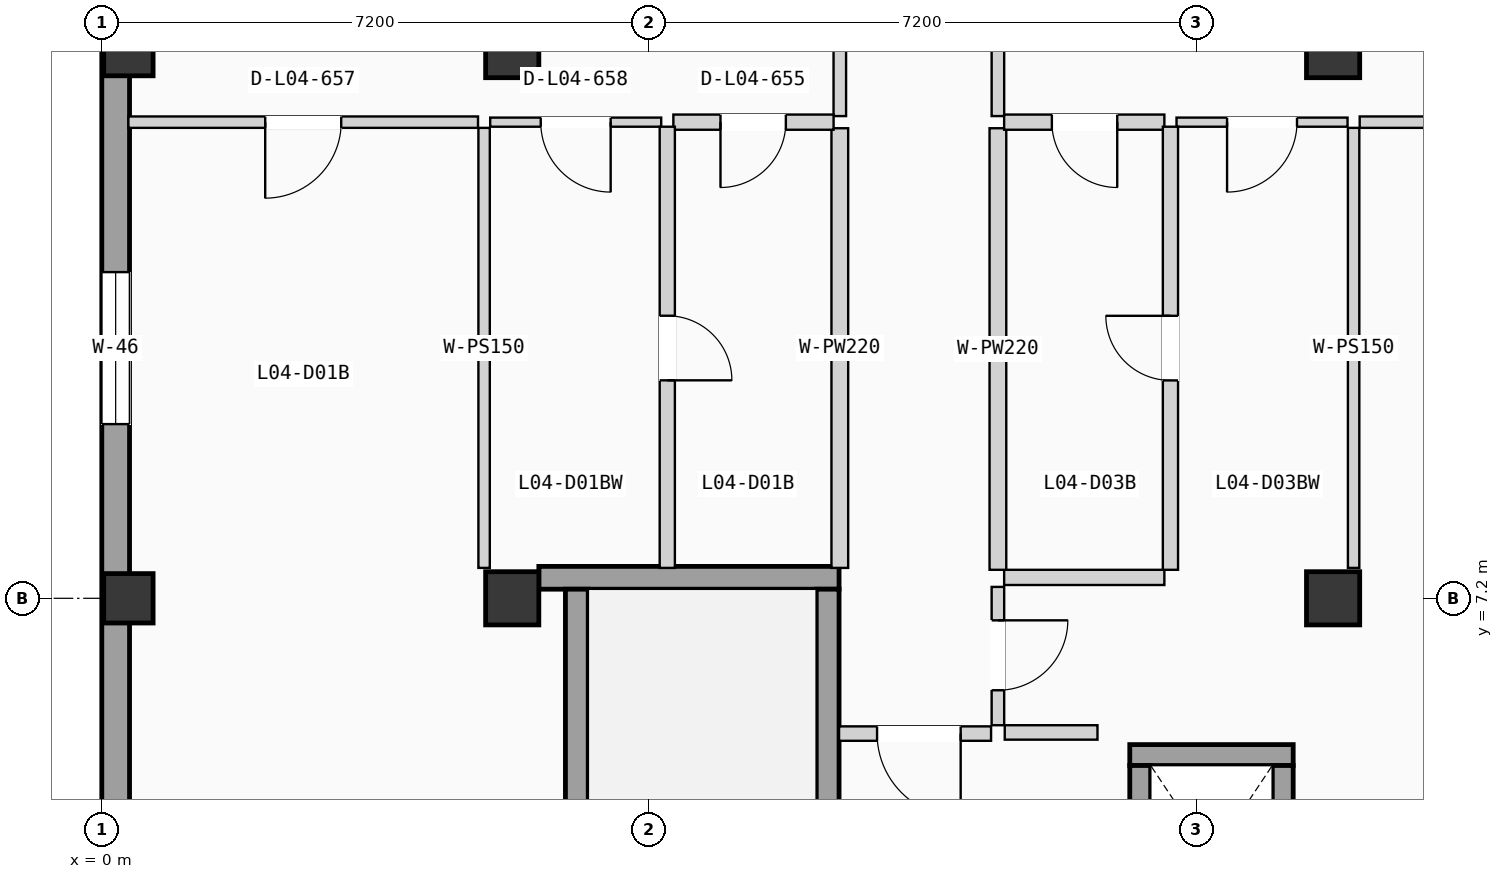
"""IFC4 building model, lengths in metres.
Left out: names, types, materials, properties, quantities, classifications, styles, units other than length and angle.
Written with IfcOpenShell. Run it as: python <this file> out.ifc"""

import sys

from ifc_helpers import new_model, si_unit, direction, frame, frame_2d, origin, origin_2d, place, context, subcontext, project, spatial, rectangle, extrude, element, fill, save


model = new_model("IFC4")
c1 = context("Model", 3, precision=1e-05, world=origin(), true_north=direction((0.0, 1.0)))
c2 = subcontext(c1, "Body", "Model", "MODEL_VIEW")
j1 = project(units=[si_unit("LENGTHUNIT", "METRE"), si_unit("PLANEANGLEUNIT", "RADIAN")], contexts=[c1])
p1 = place(None, origin())
s1 = spatial("IfcSite", under=j1, at=p1, CompositionType="ELEMENT")
p2 = place(p1, origin())
s2 = spatial("IfcBuilding", under=s1, at=p2, CompositionType="ELEMENT")
p3 = place(p2, frame((0.0, 0.0, 15.225)))
s3 = spatial("IfcBuildingStorey", under=s2, at=p3, CompositionType="ELEMENT", Elevation=15.225)
for number, where, z_axis, x_axis in (
    (1, (0.35, 7.2, 0.0), (0.0, 0.0, 1.0), (1.0, 0.0, 0.0)),
    (2, (0.35, 14.4, 0.0), (0.0, 0.0, 1.0), (1.0, 0.0, 0.0)),
):
    element("IfcColumn", number, at=place(p3, frame(where, z_axis=z_axis, x_axis=x_axis)), inside=s3, PredefinedType="COLUMN", context=c2, shape_type="SweptSolid", body=[
        extrude(rectangle(XDim=0.65, YDim=0.65, at=origin_2d()), origin(), (0.0, 0.0, 1.0), 3.15),
    ])
for number, where, z_axis, x_axis in (
    (3, (5.4, 7.2, 0.0), (0.0, 0.0, 1.0), (1.0, 0.0, 0.0)),
    (4, (5.4, 14.4, 0.0), (0.0, 0.0, 1.0), (1.0, 0.0, 0.0)),
    (5, (16.2, 7.2, 0.0), (0.0, 0.0, 1.0), (1.0, 0.0, 0.0)),
    (6, (16.2, 14.4, 0.0), (0.0, 0.0, 1.0), (1.0, 0.0, 0.0)),
):
    element("IfcColumn", number, at=place(p3, frame(where, z_axis=z_axis, x_axis=x_axis)), inside=s3, PredefinedType="COLUMN", context=c2, shape_type="SweptSolid", body=[
        extrude(rectangle(XDim=0.7, YDim=0.7, at=origin_2d()), origin(), (0.0, 0.0, 1.0), 3.15),
    ])
p4 = place(p3, frame((0.183, 0.365, 0.0), z_axis=(0.0, 0.0, 1.0), x_axis=(0.0, 1.0, 0.0)))
e7 = element("IfcWall", 7, at=p4, inside=s3, PredefinedType="SOLIDWALL", context=c2, shape_type="SweptSolid", body=[
    extrude(rectangle(XDim=49.67, YDim=0.365, at=frame_2d((24.835, 0.0))), origin(), (0.0, 0.0, 1.0), 2.89),
])
p5 = place(p4, frame((16.782, 0.0, 0.85)))
e8 = element("IfcOpeningElement", 8, at=p5, cuts=e7, PredefinedType="OPENING", context=c2, shape_type="SweptSolid", body=[
    extrude(rectangle(XDim=0.95, YDim=1.2, at=frame_2d((0.475, 0.6))), frame((0.0, 0.192, 0.0), z_axis=(0.0, -1.0, 0.0), x_axis=(1.0, 0.0, 0.0)), (0.0, 0.0, 1.0), 0.385),
])
p6 = place(p4, frame((9.127, 0.0, 0.9)))
e9 = element("IfcOpeningElement", 9, at=p6, cuts=e7, PredefinedType="OPENING", context=c2, shape_type="SweptSolid", body=[
    extrude(rectangle(XDim=2.0, YDim=1.2, at=frame_2d((1.0, 0.6))), frame((0.0, 0.192, 0.0), z_axis=(0.0, -1.0, 0.0), x_axis=(1.0, 0.0, 0.0)), (0.0, 0.0, 1.0), 0.385),
])
p7 = place(p4, frame((22.829, 0.0, 0.855)))
e10 = element("IfcOpeningElement", 10, at=p7, cuts=e7, PredefinedType="OPENING", context=c2, shape_type="SweptSolid", body=[
    extrude(rectangle(XDim=2.0, YDim=1.35, at=frame_2d((1.0, 0.675))), frame((0.0, 0.192, 0.0), z_axis=(0.0, -1.0, 0.0), x_axis=(1.0, 0.0, 0.0)), (0.0, 0.0, 1.0), 0.385),
])
p8 = place(p4, frame((32.385, 0.0, 0.705)))
e11 = element("IfcOpeningElement", 11, at=p8, cuts=e7, PredefinedType="OPENING", context=c2, shape_type="SweptSolid", body=[
    extrude(rectangle(XDim=2.0, YDim=1.5, at=frame_2d((1.0, 0.75))), frame((0.0, 0.192, 0.0), z_axis=(0.0, -1.0, 0.0), x_axis=(1.0, 0.0, 0.0)), (0.0, 0.0, 1.0), 0.385),
])
p9 = place(p4, frame((28.975, 0.0, 0.555)))
e12 = element("IfcOpeningElement", 12, at=p9, cuts=e7, PredefinedType="OPENING", context=c2, shape_type="SweptSolid", body=[
    extrude(rectangle(XDim=2.0, YDim=1.65, at=frame_2d((1.0, 0.825))), frame((0.0, 0.192, 0.0), z_axis=(0.0, -1.0, 0.0), x_axis=(1.0, 0.0, 0.0)), (0.0, 0.0, 1.0), 0.385),
])
p10 = place(p4, frame((39.504, 0.0, 0.85)))
e13 = element("IfcOpeningElement", 13, at=p10, cuts=e7, PredefinedType="OPENING", context=c2, shape_type="SweptSolid", body=[
    extrude(rectangle(XDim=0.95, YDim=1.2, at=frame_2d((0.475, 0.6))), frame((0.0, 0.192, 0.0), z_axis=(0.0, -1.0, 0.0), x_axis=(1.0, 0.0, 0.0)), (0.0, 0.0, 1.0), 0.385),
])
p11 = place(p3, frame((5.75, 7.47, 0.0), z_axis=(0.0, 0.0, 1.0), x_axis=(1.0, 0.0, 0.0)))
e14 = element("IfcWall", 14, at=p11, inside=s3, PredefinedType="SHEAR", context=c2, shape_type="SweptSolid", body=[
    extrude(rectangle(XDim=3.95, YDim=0.3, at=frame_2d((1.975, 0.0))), origin(), (0.0, 0.0, 1.0), 2.89),
])
p12 = place(p3, frame((6.25, 0.32, 0.0), z_axis=(0.0, 0.0, 1.0), x_axis=(0.0, 1.0, 0.0)))
e15 = element("IfcWall", 15, at=p12, inside=s3, PredefinedType="SHEAR", context=c2, shape_type="SweptSolid", body=[
    extrude(rectangle(XDim=7.0, YDim=0.3, at=frame_2d((3.5, 0.0))), origin(), (0.0, 0.0, 1.0), 2.89),
])
p13 = place(p3, frame((9.55, 0.32, 0.0), z_axis=(0.0, 0.0, 1.0), x_axis=(0.0, 1.0, 0.0)))
e16 = element("IfcWall", 16, at=p13, inside=s3, PredefinedType="SHEAR", context=c2, shape_type="SweptSolid", body=[
    extrude(rectangle(XDim=7.0, YDim=0.3, at=frame_2d((3.5, 0.0))), origin(), (0.0, 0.0, 1.0), 2.89),
])
p14 = place(p13, frame((0.225, 0.0, 0.0)))
e17 = element("IfcOpeningElement", 17, at=p14, cuts=e16, PredefinedType="OPENING", context=c2, shape_type="SweptSolid", body=[
    extrude(rectangle(XDim=1.15, YDim=2.12, at=frame_2d((0.575, 1.06))), frame((0.0, 0.16, 0.0), z_axis=(0.0, -1.0, 0.0), x_axis=(1.0, 0.0, 0.0)), (0.0, 0.0, 1.0), 0.32),
])
p15 = place(p3, frame((13.525, 5.137, 0.0), z_axis=(0.0, 0.0, 1.0), x_axis=(1.0, 0.0, 0.0)))
e18 = element("IfcWall", 18, at=p15, inside=s3, PredefinedType="SHEAR", context=c2, shape_type="SweptSolid", body=[
    extrude(rectangle(XDim=2.15, YDim=0.275, at=frame_2d((1.075, 0.0))), origin(), (0.0, 0.0, 1.0), 2.89),
])
p16 = place(p3, frame((13.663, 2.6, 0.0), z_axis=(0.0, 0.0, 1.0), x_axis=(0.0, 1.0, 0.0)))
e19 = element("IfcWall", 19, at=p16, inside=s3, PredefinedType="SHEAR", context=c2, shape_type="SweptSolid", body=[
    extrude(rectangle(XDim=2.4, YDim=0.275, at=frame_2d((1.2, 0.0))), origin(), (0.0, 0.0, 1.0), 2.89),
])
p17 = place(p16, frame((0.65, 0.0, 0.0)))
e20 = element("IfcOpeningElement", 20, at=p17, cuts=e19, PredefinedType="OPENING", context=c2, shape_type="SweptSolid", body=[
    extrude(rectangle(XDim=1.1, YDim=2.15, at=frame_2d((0.55, 1.075))), frame((0.0, 0.147, 0.0), z_axis=(0.0, -1.0, 0.0), x_axis=(1.0, 0.0, 0.0)), (0.0, 0.0, 1.0), 0.295),
])
p18 = place(p3, frame((15.538, 2.6, 0.0), z_axis=(0.0, 0.0, 1.0), x_axis=(0.0, 1.0, 0.0)))
e21 = element("IfcWall", 21, at=p18, inside=s3, PredefinedType="SHEAR", context=c2, shape_type="SweptSolid", body=[
    extrude(rectangle(XDim=2.4, YDim=0.275, at=frame_2d((1.2, 0.0))), origin(), (0.0, 0.0, 1.0), 2.89),
])
p19 = place(p3, frame((11.88, 5.435, 0.0), z_axis=(0.0, 0.0, 1.0), x_axis=(1.0, 0.0, 0.0)))
e22 = element("IfcWall", 22, at=p19, inside=s3, PredefinedType="PARTITIONING", context=c2, shape_type="SweptSolid", body=[
    extrude(rectangle(XDim=1.22, YDim=0.19, at=frame_2d((0.61, 0.0))), origin(), (0.0, 0.0, 1.0), 2.87),
])
p20 = place(p3, frame((9.7, 5.42, 0.0), z_axis=(0.0, 0.0, 1.0), x_axis=(1.0, 0.0, 0.0)))
e23 = element("IfcWall", 23, at=p20, inside=s3, PredefinedType="PARTITIONING", context=c2, shape_type="SweptSolid", body=[
    extrude(rectangle(XDim=2.0, YDim=0.19, at=frame_2d((1.0, 0.0))), origin(), (0.0, 0.0, 1.0), 2.87),
])
p21 = place(p20, frame((0.5, 0.0, 0.0)))
e24 = element("IfcOpeningElement", 24, at=p21, cuts=e23, PredefinedType="OPENING", context=c2, shape_type="SweptSolid", body=[
    extrude(rectangle(XDim=1.1, YDim=2.12, at=frame_2d((0.55, 1.06))), frame((0.0, 0.105, 0.0), z_axis=(0.0, -1.0, 0.0), x_axis=(1.0, 0.0, 0.0)), (0.0, 0.0, 1.0), 0.21),
])
p22 = place(p3, frame((11.79, 5.53, 0.0), z_axis=(0.0, 0.0, 1.0), x_axis=(0.0, 1.0, 0.0)))
e25 = element("IfcWall", 25, at=p22, inside=s3, PredefinedType="PARTITIONING", context=c2, shape_type="SweptSolid", body=[
    extrude(rectangle(XDim=1.82, YDim=0.165, at=frame_2d((0.91, 0.0))), origin(), (0.0, 0.0, 1.0), 2.87),
])
p23 = place(p22, frame((0.46, 0.0, 0.0)))
e26 = element("IfcOpeningElement", 26, at=p23, cuts=e25, PredefinedType="OPENING", context=c2, shape_type="SweptSolid", body=[
    extrude(rectangle(XDim=0.92, YDim=2.04, at=frame_2d((0.46, 1.02))), frame((0.0, 0.093, 0.0), z_axis=(0.0, -1.0, 0.0), x_axis=(1.0, 0.0, 0.0)), (0.0, 0.0, 1.0), 0.185),
])
p24 = place(p3, frame((11.872, 7.475, 0.0), z_axis=(0.0, 0.0, 1.0), x_axis=(1.0, 0.0, 0.0)))
e27 = element("IfcWall", 27, at=p24, inside=s3, PredefinedType="PLUMBINGWALL", context=c2, shape_type="SweptSolid", body=[
    extrude(rectangle(XDim=2.108, YDim=0.2, at=frame_2d((1.054, 0.0))), origin(), (0.0, 0.0, 1.0), 2.87),
])
p25 = place(p3, frame((9.71, 13.545, 0.0), z_axis=(0.0, 0.0, 1.0), x_axis=(0.0, 1.0, 0.0)))
e28 = element("IfcWall", 28, at=p25, inside=s3, PredefinedType="PARTITIONING", context=c2, shape_type="SweptSolid", body=[
    extrude(rectangle(XDim=7.028, YDim=0.165, at=frame_2d((3.514, 0.0))), origin(), (0.0, 0.0, 1.0), 2.87),
])
p26 = place(p25, frame((3.009, 0.0, 0.0)))
e29 = element("IfcOpeningElement", 29, at=p26, cuts=e28, PredefinedType="OPENING", context=c2, shape_type="SweptSolid", body=[
    extrude(rectangle(XDim=1.01, YDim=2.11, at=frame_2d((0.505, 1.055))), frame((0.0, 0.093, 0.0), z_axis=(0.0, -1.0, 0.0), x_axis=(1.0, 0.0, 0.0)), (0.0, 0.0, 1.0), 0.185),
])
p27 = place(p3, frame((9.71, 7.6, 0.0), z_axis=(0.0, 0.0, 1.0), x_axis=(0.0, 1.0, 0.0)))
e30 = element("IfcWall", 30, at=p27, inside=s3, PredefinedType="PLUMBINGWALL", context=c2, shape_type="SweptSolid", body=[
    extrude(rectangle(XDim=5.785, YDim=0.22, at=frame_2d((2.893, 0.0))), origin(), (0.0, 0.0, 1.0), 2.87),
])
p28 = place(p3, frame((11.79, 13.545, 0.0), z_axis=(0.0, 0.0, 1.0), x_axis=(0.0, 1.0, 0.0)))
e31 = element("IfcWall", 31, at=p28, inside=s3, PredefinedType="PARTITIONING", context=c2, shape_type="SweptSolid", body=[
    extrude(rectangle(XDim=7.028, YDim=0.165, at=frame_2d((3.514, 0.0))), origin(), (0.0, 0.0, 1.0), 2.87),
])
p29 = place(p28, frame((3.009, 0.0, 0.0)))
e32 = element("IfcOpeningElement", 32, at=p29, cuts=e31, PredefinedType="OPENING", context=c2, shape_type="SweptSolid", body=[
    extrude(rectangle(XDim=1.01, YDim=2.11, at=frame_2d((0.505, 1.055))), frame((0.0, 0.093, 0.0), z_axis=(0.0, -1.0, 0.0), x_axis=(1.0, 0.0, 0.0)), (0.0, 0.0, 1.0), 0.185),
])
p30 = place(p3, frame((11.79, 7.575, 0.0), z_axis=(0.0, 0.0, 1.0), x_axis=(0.0, 1.0, 0.0)))
e33 = element("IfcWall", 33, at=p30, inside=s3, PredefinedType="PLUMBINGWALL", context=c2, shape_type="SweptSolid", body=[
    extrude(rectangle(XDim=5.81, YDim=0.22, at=frame_2d((2.905, 0.0))), origin(), (0.0, 0.0, 1.0), 2.87),
])
p31 = place(p3, frame((7.52, 13.465, 0.0), z_axis=(0.0, 0.0, 1.0), x_axis=(1.0, 0.0, 0.0)))
e34 = element("IfcWall", 34, at=p31, inside=s3, PredefinedType="PLUMBINGWALL", context=c2, shape_type="SweptSolid", body=[
    extrude(rectangle(XDim=2.108, YDim=0.2, at=frame_2d((1.054, 0.0))), origin(), (0.0, 0.0, 1.0), 2.87),
])
p32 = place(p31, frame((0.62, 0.0, 0.0)))
e35 = element("IfcOpeningElement", 35, at=p32, cuts=e34, PredefinedType="OPENING", context=c2, shape_type="SweptSolid", body=[
    extrude(rectangle(XDim=0.86, YDim=2.0, at=frame_2d((0.43, 1.0))), frame((0.0, 0.11, 0.0), z_axis=(0.0, -1.0, 0.0), x_axis=(1.0, 0.0, 0.0)), (0.0, 0.0, 1.0), 0.22),
])
p33 = place(p3, frame((0.35, 13.465, 0.0), z_axis=(0.0, 0.0, 1.0), x_axis=(1.0, 0.0, 0.0)))
e36 = element("IfcWall", 36, at=p33, inside=s3, PredefinedType="PARTITIONING", context=c2, shape_type="SweptSolid", body=[
    extrude(rectangle(XDim=4.6, YDim=0.15, at=frame_2d((2.3, 0.0))), origin(), (0.0, 0.0, 1.0), 2.87),
])
p34 = place(p33, frame((1.8, 0.0, 0.0)))
e37 = element("IfcOpeningElement", 37, at=p34, cuts=e36, PredefinedType="OPENING", context=c2, shape_type="SweptSolid", body=[
    extrude(rectangle(XDim=1.0, YDim=2.06, at=frame_2d((0.5, 1.03))), frame((0.0, 0.085, 0.0), z_axis=(0.0, -1.0, 0.0), x_axis=(1.0, 0.0, 0.0)), (0.0, 0.0, 1.0), 0.17),
])
p35 = place(p3, frame((5.11, 13.465, 0.0), z_axis=(0.0, 0.0, 1.0), x_axis=(1.0, 0.0, 0.0)))
e38 = element("IfcWall", 38, at=p35, inside=s3, PredefinedType="PARTITIONING", context=c2, shape_type="SweptSolid", body=[
    extrude(rectangle(XDim=2.25, YDim=0.12, at=frame_2d((1.125, 0.0))), origin(), (0.0, 0.0, 1.0), 2.87),
])
p36 = place(p35, frame((0.665, 0.0, 0.0)))
e39 = element("IfcOpeningElement", 39, at=p36, cuts=e38, PredefinedType="OPENING", context=c2, shape_type="SweptSolid", body=[
    extrude(rectangle(XDim=0.92, YDim=2.02, at=frame_2d((0.46, 1.01))), frame((0.0, 0.07, 0.0), z_axis=(0.0, -1.0, 0.0), x_axis=(1.0, 0.0, 0.0)), (0.0, 0.0, 1.0), 0.14),
])
p37 = place(p3, frame((7.44, 7.6, 0.0), z_axis=(0.0, 0.0, 1.0), x_axis=(0.0, 1.0, 0.0)))
e40 = element("IfcWall", 40, at=p37, inside=s3, PredefinedType="PLUMBINGWALL", context=c2, shape_type="SweptSolid", body=[
    extrude(rectangle(XDim=5.805, YDim=0.2, at=frame_2d((2.902, 0.0))), origin(), (0.0, 0.0, 1.0), 2.87),
])
p38 = place(p37, frame((2.468, 0.0, 0.0)))
e41 = element("IfcOpeningElement", 41, at=p38, cuts=e40, PredefinedType="OPENING", context=c2, shape_type="SweptSolid", body=[
    extrude(rectangle(XDim=0.85, YDim=2.01, at=frame_2d((0.425, 1.005))), frame((0.0, 0.11, 0.0), z_axis=(0.0, -1.0, 0.0), x_axis=(1.0, 0.0, 0.0)), (0.0, 0.0, 1.0), 0.22),
])
p39 = place(p3, frame((5.03, 7.6, 0.0), z_axis=(0.0, 0.0, 1.0), x_axis=(0.0, 1.0, 0.0)))
e42 = element("IfcWall", 42, at=p39, inside=s3, PredefinedType="PARTITIONING", context=c2, shape_type="SweptSolid", body=[
    extrude(rectangle(XDim=5.79, YDim=0.15, at=frame_2d((2.895, 0.0))), origin(), (0.0, 0.0, 1.0), 2.87),
])
p40 = place(p3, frame((11.872, 13.465, 0.0), z_axis=(0.0, 0.0, 1.0), x_axis=(1.0, 0.0, 0.0)))
e43 = element("IfcWall", 43, at=p40, inside=s3, PredefinedType="PLUMBINGWALL", context=c2, shape_type="SweptSolid", body=[
    extrude(rectangle(XDim=2.108, YDim=0.2, at=frame_2d((1.054, 0.0))), origin(), (0.0, 0.0, 1.0), 2.87),
])
p41 = place(p40, frame((0.628, 0.0, 0.0)))
e44 = element("IfcOpeningElement", 44, at=p41, cuts=e43, PredefinedType="OPENING", context=c2, shape_type="SweptSolid", body=[
    extrude(rectangle(XDim=0.86, YDim=2.0, at=frame_2d((0.43, 1.0))), frame((0.0, 0.11, 0.0), z_axis=(0.0, -1.0, 0.0), x_axis=(1.0, 0.0, 0.0)), (0.0, 0.0, 1.0), 0.22),
])
p42 = place(p3, frame((16.55, 13.465, 0.0), z_axis=(0.0, 0.0, 1.0), x_axis=(1.0, 0.0, 0.0)))
e45 = element("IfcWall", 45, at=p42, inside=s3, PredefinedType="PARTITIONING", context=c2, shape_type="SweptSolid", body=[
    extrude(rectangle(XDim=4.7, YDim=0.15, at=frame_2d((2.35, 0.0))), origin(), (0.0, 0.0, 1.0), 2.87),
])
p43 = place(p42, frame((1.88, 0.0, 0.0)))
e46 = element("IfcOpeningElement", 46, at=p43, cuts=e45, PredefinedType="OPENING", context=c2, shape_type="SweptSolid", body=[
    extrude(rectangle(XDim=0.94, YDim=2.06, at=frame_2d((0.47, 1.03))), frame((0.0, 0.085, 0.0), z_axis=(0.0, -1.0, 0.0), x_axis=(1.0, 0.0, 0.0)), (0.0, 0.0, 1.0), 0.17),
])
p44 = place(p3, frame((14.14, 13.465, 0.0), z_axis=(0.0, 0.0, 1.0), x_axis=(1.0, 0.0, 0.0)))
e47 = element("IfcWall", 47, at=p44, inside=s3, PredefinedType="PARTITIONING", context=c2, shape_type="SweptSolid", body=[
    extrude(rectangle(XDim=2.25, YDim=0.12, at=frame_2d((1.125, 0.0))), origin(), (0.0, 0.0, 1.0), 2.87),
])
p45 = place(p44, frame((0.665, 0.0, 0.0)))
e48 = element("IfcOpeningElement", 48, at=p45, cuts=e47, PredefinedType="OPENING", context=c2, shape_type="SweptSolid", body=[
    extrude(rectangle(XDim=0.92, YDim=2.02, at=frame_2d((0.46, 1.01))), frame((0.0, 0.07, 0.0), z_axis=(0.0, -1.0, 0.0), x_axis=(1.0, 0.0, 0.0)), (0.0, 0.0, 1.0), 0.14),
])
p46 = place(p3, frame((14.06, 7.575, 0.0), z_axis=(0.0, 0.0, 1.0), x_axis=(0.0, 1.0, 0.0)))
e49 = element("IfcWall", 49, at=p46, inside=s3, PredefinedType="PLUMBINGWALL", context=c2, shape_type="SweptSolid", body=[
    extrude(rectangle(XDim=5.83, YDim=0.2, at=frame_2d((2.915, 0.0))), origin(), (0.0, 0.0, 1.0), 2.87),
])
p47 = place(p46, frame((2.492, 0.0, 0.0)))
e50 = element("IfcOpeningElement", 50, at=p47, cuts=e49, PredefinedType="OPENING", context=c2, shape_type="SweptSolid", body=[
    extrude(rectangle(XDim=0.85, YDim=2.01, at=frame_2d((0.425, 1.005))), frame((0.0, 0.11, 0.0), z_axis=(0.0, -1.0, 0.0), x_axis=(1.0, 0.0, 0.0)), (0.0, 0.0, 1.0), 0.22),
])
p48 = place(p3, frame((16.47, 7.6, 0.0), z_axis=(0.0, 0.0, 1.0), x_axis=(0.0, 1.0, 0.0)))
e51 = element("IfcWall", 51, at=p48, inside=s3, PredefinedType="PARTITIONING", context=c2, shape_type="SweptSolid", body=[
    extrude(rectangle(XDim=5.79, YDim=0.15, at=frame_2d((2.895, 0.0))), origin(), (0.0, 0.0, 1.0), 2.87),
])
p49 = place(p6, origin())
e52 = element("IfcWindow", 52, at=p49, inside=s3, PartitioningType="DOUBLE_PANEL_VERTICAL", PredefinedType="WINDOW", context=c2, shape_type="SweptSolid", body=[
    extrude(rectangle(XDim=2.0, YDim=1.2, at=frame_2d((1.0, 0.6))), frame((0.0, 0.03, 0.0), z_axis=(0.0, -1.0, 0.0), x_axis=(1.0, 0.0, 0.0)), (0.0, 0.0, 1.0), 0.06),
])
fill(e9, e52)
p50 = place(p21, frame((1.1, 0.0, 0.0), z_axis=(0.0, 0.0, 1.0), x_axis=(-1.0, 0.0, 0.0)))
e53 = element("IfcDoor", 53, at=p50, inside=s3, OperationType="SINGLE_SWING_RIGHT", PredefinedType="DOOR", context=c2, shape_type="SweptSolid", body=[
    extrude(rectangle(XDim=1.1, YDim=2.12, at=frame_2d((0.55, 1.06))), frame((0.0, 0.025, 0.0), z_axis=(0.0, -1.0, 0.0), x_axis=(1.0, 0.0, 0.0)), (0.0, 0.0, 1.0), 0.05),
])
fill(e24, e53)
p51 = place(p23, frame((0.92, 0.0, 0.0), z_axis=(0.0, 0.0, 1.0), x_axis=(-1.0, 0.0, 0.0)))
e54 = element("IfcDoor", 54, at=p51, inside=s3, OperationType="SINGLE_SWING_RIGHT", PredefinedType="DOOR", context=c2, shape_type="SweptSolid", body=[
    extrude(rectangle(XDim=0.92, YDim=2.04, at=frame_2d((0.46, 1.02))), frame((0.0, 0.025, 0.0), z_axis=(0.0, -1.0, 0.0), x_axis=(1.0, 0.0, 0.0)), (0.0, 0.0, 1.0), 0.05),
])
fill(e26, e54)
p52 = place(p32, frame((0.86, 0.0, 0.0), z_axis=(0.0, 0.0, 1.0), x_axis=(-1.0, 0.0, 0.0)))
e55 = element("IfcDoor", 55, at=p52, inside=s3, OperationType="SINGLE_SWING_LEFT", PredefinedType="DOOR", context=c2, shape_type="SweptSolid", body=[
    extrude(rectangle(XDim=0.86, YDim=2.0, at=frame_2d((0.43, 1.0))), frame((0.0, 0.025, 0.0), z_axis=(0.0, -1.0, 0.0), x_axis=(1.0, 0.0, 0.0)), (0.0, 0.0, 1.0), 0.05),
])
fill(e35, e55)
p53 = place(p34, frame((1.0, 0.0, 0.0), z_axis=(0.0, 0.0, 1.0), x_axis=(-1.0, 0.0, 0.0)))
e56 = element("IfcDoor", 56, at=p53, inside=s3, OperationType="SINGLE_SWING_LEFT", PredefinedType="DOOR", context=c2, shape_type="SweptSolid", body=[
    extrude(rectangle(XDim=1.0, YDim=2.06, at=frame_2d((0.5, 1.03))), frame((0.0, 0.025, 0.0), z_axis=(0.0, -1.0, 0.0), x_axis=(1.0, 0.0, 0.0)), (0.0, 0.0, 1.0), 0.05),
])
fill(e37, e56)
p54 = place(p36, frame((0.92, 0.0, 0.0), z_axis=(0.0, 0.0, 1.0), x_axis=(-1.0, 0.0, 0.0)))
e57 = element("IfcDoor", 57, at=p54, inside=s3, OperationType="SINGLE_SWING_RIGHT", PredefinedType="DOOR", context=c2, shape_type="SweptSolid", body=[
    extrude(rectangle(XDim=0.92, YDim=2.02, at=frame_2d((0.46, 1.01))), frame((0.0, 0.025, 0.0), z_axis=(0.0, -1.0, 0.0), x_axis=(1.0, 0.0, 0.0)), (0.0, 0.0, 1.0), 0.05),
])
fill(e39, e57)
p55 = place(p38, frame((0.85, 0.0, 0.0), z_axis=(0.0, 0.0, 1.0), x_axis=(-1.0, 0.0, 0.0)))
e58 = element("IfcDoor", 58, at=p55, inside=s3, OperationType="SINGLE_SWING_LEFT", PredefinedType="DOOR", context=c2, shape_type="SweptSolid", body=[
    extrude(rectangle(XDim=0.85, YDim=2.01, at=frame_2d((0.425, 1.005))), frame((0.0, 0.025, 0.0), z_axis=(0.0, -1.0, 0.0), x_axis=(1.0, 0.0, 0.0)), (0.0, 0.0, 1.0), 0.05),
])
fill(e41, e58)
p56 = place(p41, frame((0.86, 0.0, 0.0), z_axis=(0.0, 0.0, 1.0), x_axis=(-1.0, 0.0, 0.0)))
e59 = element("IfcDoor", 59, at=p56, inside=s3, OperationType="SINGLE_SWING_RIGHT", PredefinedType="DOOR", context=c2, shape_type="SweptSolid", body=[
    extrude(rectangle(XDim=0.86, YDim=2.0, at=frame_2d((0.43, 1.0))), frame((0.0, 0.025, 0.0), z_axis=(0.0, -1.0, 0.0), x_axis=(1.0, 0.0, 0.0)), (0.0, 0.0, 1.0), 0.05),
])
fill(e44, e59)
p57 = place(p45, frame((0.92, 0.0, 0.0), z_axis=(0.0, 0.0, 1.0), x_axis=(-1.0, 0.0, 0.0)))
e60 = element("IfcDoor", 60, at=p57, inside=s3, OperationType="SINGLE_SWING_LEFT", PredefinedType="DOOR", context=c2, shape_type="SweptSolid", body=[
    extrude(rectangle(XDim=0.92, YDim=2.02, at=frame_2d((0.46, 1.01))), frame((0.0, 0.025, 0.0), z_axis=(0.0, -1.0, 0.0), x_axis=(1.0, 0.0, 0.0)), (0.0, 0.0, 1.0), 0.05),
])
fill(e48, e60)
p58 = place(p47, origin())
e61 = element("IfcDoor", 61, at=p58, inside=s3, OperationType="SINGLE_SWING_RIGHT", PredefinedType="DOOR", context=c2, shape_type="SweptSolid", body=[
    extrude(rectangle(XDim=0.85, YDim=2.01, at=frame_2d((0.425, 1.005))), frame((0.0, 0.025, 0.0), z_axis=(0.0, -1.0, 0.0), x_axis=(1.0, 0.0, 0.0)), (0.0, 0.0, 1.0), 0.05),
])
fill(e50, e61)
save(model, sys.argv[1])
